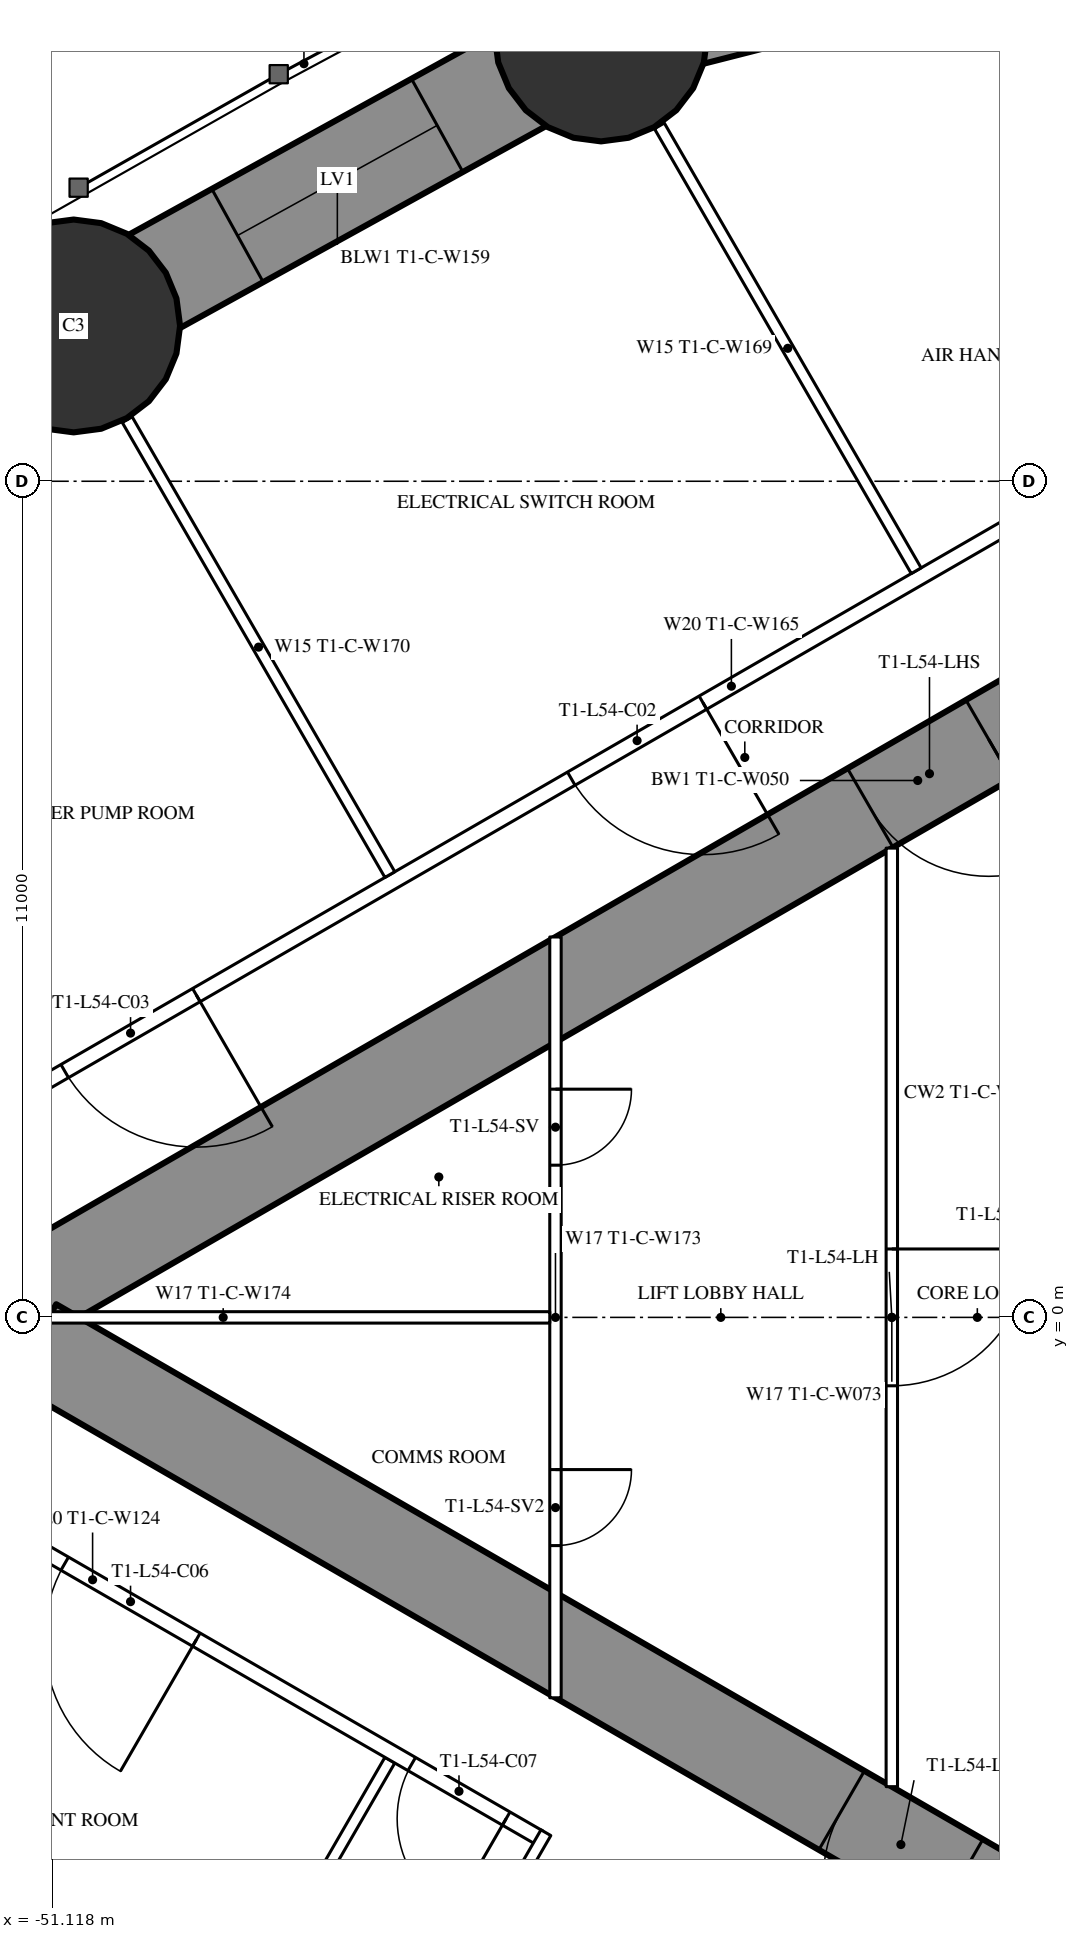
"""IFC4 building model, lengths in metres.
Left out: names, types, materials, properties, quantities, classifications, styles, units other than length and angle.
Written with IfcOpenShell. Run it as: python <this file> out.ifc"""

import sys

from ifc_helpers import new_model, si_unit, direction, frame, frame_2d, origin, origin_2d, place, context, subcontext, project, spatial, rectangle, circle, extrude, element, fill, save


model = new_model("IFC4")
c1 = context("Model", 3, precision=1e-05, world=origin(), true_north=direction((0.0, 1.0)))
c2 = subcontext(c1, "Body", "Model", "MODEL_VIEW")
j1 = project(units=[si_unit("LENGTHUNIT", "METRE"), si_unit("PLANEANGLEUNIT", "RADIAN")], contexts=[c1])
p1 = place(None, origin())
s1 = spatial("IfcSite", under=j1, at=p1, CompositionType="ELEMENT")
p2 = place(p1, origin())
s2 = spatial("IfcBuilding", under=s1, at=p2, CompositionType="ELEMENT")
p3 = place(p2, frame((0.0, 0.0, 201.8)))
s3 = spatial("IfcBuildingStorey", under=s2, at=p3, CompositionType="ELEMENT", Elevation=201.8)
for number, where, z_axis, x_axis in (
    (1, (-43.9, 16.871, 0.0), (0.0, 0.0, 1.0), (1.0, 0.0, 0.0)),
    (2, (-50.839, 13.043, 0.0), (0.0, 0.0, 1.0), (1.0, 0.0, 0.0)),
):
    element("IfcColumn", number, at=place(p3, frame(where, z_axis=z_axis, x_axis=x_axis)), inside=s3, PredefinedType="COLUMN", context=c2, shape_type="SweptSolid", body=[
        extrude(circle(Radius=1.4, at=origin_2d()), origin(), (0.0, 0.0, 1.0), 3.5),
    ])
p4 = place(p3, frame((-27.2, 14.3, 0.0), z_axis=(0.0, 0.0, 1.0), x_axis=(-0.866026593062, -0.499997940104, 0.0)))
e3 = element("IfcWall", 3, at=p4, inside=s3, PredefinedType="SHEAR", context=c2, shape_type="SweptSolid", body=[
    extrude(rectangle(XDim=28.946, YDim=1.2, at=frame_2d((14.473, 0.0))), origin(), (0.0, 0.0, 1.0), 3.5),
])
p5 = place(p4, frame((6.5, 0.0, 0.0)))
e4 = element("IfcOpeningElement", 4, at=p5, cuts=e3, PredefinedType="OPENING", context=c2, shape_type="SweptSolid", body=[
    extrude(rectangle(XDim=1.0, YDim=2.2, at=frame_2d((0.5, 1.1))), frame((0.0, 0.61, 0.0), z_axis=(0.0, -1.0, 0.0), x_axis=(1.0, 0.0, 0.0)), (0.0, 0.0, 1.0), 1.22),
])
p6 = place(p4, frame((13.395, 0.0, 0.0)))
e5 = element("IfcOpeningElement", 5, at=p6, cuts=e3, PredefinedType="OPENING", context=c2, shape_type="SweptSolid", body=[
    extrude(rectangle(XDim=1.8, YDim=2.03, at=frame_2d((0.9, 1.015))), frame((0.0, 0.61, 0.0), z_axis=(0.0, -1.0, 0.0), x_axis=(1.0, 0.0, 0.0)), (0.0, 0.0, 1.0), 1.22),
])
p7 = place(p3, frame((-27.2, -14.3, 0.0), z_axis=(0.0, 0.0, 1.0), x_axis=(-0.866024021859, 0.500002393557, 0.0)))
e6 = element("IfcWall", 6, at=p7, inside=s3, PredefinedType="SHEAR", context=c2, shape_type="SweptSolid", body=[
    extrude(rectangle(XDim=27.907, YDim=1.2, at=frame_2d((13.954, 0.0))), origin(), (0.0, 0.0, 1.0), 3.5),
])
p8 = place(p7, frame((6.5, 0.0, 0.0)))
e7 = element("IfcOpeningElement", 7, at=p8, cuts=e6, PredefinedType="OPENING", context=c2, shape_type="SweptSolid", body=[
    extrude(rectangle(XDim=1.0, YDim=2.2, at=frame_2d((0.5, 1.1))), frame((0.0, 0.61, 0.0), z_axis=(0.0, -1.0, 0.0), x_axis=(1.0, 0.0, 0.0)), (0.0, 0.0, 1.0), 1.22),
])
p9 = place(p7, frame((13.829, 0.0, 0.0)))
e8 = element("IfcOpeningElement", 8, at=p9, cuts=e6, PredefinedType="OPENING", context=c2, shape_type="SweptSolid", body=[
    extrude(rectangle(XDim=1.8, YDim=2.2, at=frame_2d((0.9, 1.1))), frame((0.0, 0.61, 0.0), z_axis=(0.0, -1.0, 0.0), x_axis=(1.0, 0.0, 0.0)), (0.0, 0.0, 1.0), 1.22),
])
p10 = place(p3, frame((-31.565, 20.016, 0.0), z_axis=(0.0, 0.0, 1.0), x_axis=(-0.969008414312, -0.247027717052, 0.0)))
e9 = element("IfcWall", 9, at=p10, inside=s3, PredefinedType="SHEAR", context=c2, shape_type="SweptSolid", body=[
    extrude(rectangle(XDim=12.729, YDim=1.4, at=frame_2d((6.365, 0.0))), origin(), (0.0, 0.0, 1.0), 3.5),
])
p11 = place(p10, frame((4.865, 0.0, 0.6)))
e10 = element("IfcOpeningElement", 10, at=p11, cuts=e9, PredefinedType="OPENING", context=c2, shape_type="SweptSolid", body=[
    extrude(rectangle(XDim=3.0, YDim=1.2, at=frame_2d((1.5, 0.6))), frame((0.0, 0.71, 0.0), z_axis=(0.0, -1.0, 0.0), x_axis=(1.0, 0.0, 0.0)), (0.0, 0.0, 1.0), 1.42),
])
p12 = place(p3, frame((-43.9, 16.871, 0.0), z_axis=(0.0, 0.0, 1.0), x_axis=(-0.875577684027, -0.483077342911, 0.0)))
e11 = element("IfcWall", 11, at=p12, inside=s3, PredefinedType="SHEAR", context=c2, shape_type="SweptSolid", body=[
    extrude(rectangle(XDim=7.925, YDim=1.4, at=frame_2d((3.962, 0.0))), origin(), (0.0, 0.0, 1.0), 3.5),
])
p13 = place(p12, frame((2.462, 0.0, 0.6)))
e12 = element("IfcOpeningElement", 12, at=p13, cuts=e11, PredefinedType="OPENING", context=c2, shape_type="SweptSolid", body=[
    extrude(rectangle(XDim=3.0, YDim=1.2, at=frame_2d((1.5, 0.6))), frame((0.0, 0.71, 0.0), z_axis=(0.0, -1.0, 0.0), x_axis=(1.0, 0.0, 0.0)), (0.0, 0.0, 1.0), 1.42),
])
p14 = place(p3, frame((-50.839, 13.043, 0.0), z_axis=(0.0, 0.0, 1.0), x_axis=(-0.851892008043, -0.523717487423, 0.0)))
e13 = element("IfcWall", 13, at=p14, inside=s3, PredefinedType="SHEAR", context=c2, shape_type="SweptSolid", body=[
    extrude(rectangle(XDim=7.924, YDim=1.4, at=frame_2d((3.962, 0.0))), origin(), (0.0, 0.0, 1.0), 3.5),
])
p15 = place(p14, frame((2.462, 0.0, 0.6)))
e14 = element("IfcOpeningElement", 14, at=p15, cuts=e13, PredefinedType="OPENING", context=c2, shape_type="SweptSolid", body=[
    extrude(rectangle(XDim=3.0, YDim=1.2, at=frame_2d((1.5, 0.6))), frame((0.0, 0.71, 0.0), z_axis=(0.0, -1.0, 0.0), x_axis=(1.0, 0.0, 0.0)), (0.0, 0.0, 1.0), 1.42),
])
p16 = place(p3, frame((-27.803, 16.608, 0.0), z_axis=(0.0, 0.0, 1.0), x_axis=(-0.866025851808, -0.499999223999, 0.0)))
e15 = element("IfcWall", 15, at=p16, inside=s3, PredefinedType="PARTITIONING", context=c2, shape_type="SweptSolid", body=[
    extrude(rectangle(XDim=33.215, YDim=0.2, at=frame_2d((16.608, 0.0))), origin(), (0.0, 0.0, 1.0), 3.25),
])
p17 = place(p16, frame((5.584, 0.0, 0.0)))
e16 = element("IfcOpeningElement", 16, at=p17, cuts=e15, PredefinedType="OPENING", context=c2, shape_type="SweptSolid", body=[
    extrude(rectangle(XDim=2.0, YDim=2.4, at=frame_2d((1.0, 1.2))), frame((0.0, 0.11, 0.0), z_axis=(0.0, -1.0, 0.0), x_axis=(1.0, 0.0, 0.0)), (0.0, 0.0, 1.0), 0.22),
])
p18 = place(p16, frame((17.04, 0.0, 0.0)))
e17 = element("IfcOpeningElement", 17, at=p18, cuts=e15, PredefinedType="OPENING", context=c2, shape_type="SweptSolid", body=[
    extrude(rectangle(XDim=2.0, YDim=2.4, at=frame_2d((1.0, 1.2))), frame((0.0, 0.11, 0.0), z_axis=(0.0, -1.0, 0.0), x_axis=(1.0, 0.0, 0.0)), (0.0, 0.0, 1.0), 0.22),
])
p19 = place(p16, frame((24.735, 0.0, 0.0)))
e18 = element("IfcOpeningElement", 18, at=p19, cuts=e15, PredefinedType="OPENING", context=c2, shape_type="SweptSolid", body=[
    extrude(rectangle(XDim=2.0, YDim=2.4, at=frame_2d((1.0, 1.2))), frame((0.0, 0.11, 0.0), z_axis=(0.0, -1.0, 0.0), x_axis=(1.0, 0.0, 0.0)), (0.0, 0.0, 1.0), 0.22),
])
p20 = place(p16, frame((30.361, 0.0, 0.0)))
e19 = element("IfcOpeningElement", 19, at=p20, cuts=e15, PredefinedType="OPENING", context=c2, shape_type="SweptSolid", body=[
    extrude(rectangle(XDim=2.0, YDim=2.03, at=frame_2d((1.0, 1.015))), frame((0.0, 0.11, 0.0), z_axis=(0.0, -1.0, 0.0), x_axis=(1.0, 0.0, 0.0)), (0.0, 0.0, 1.0), 0.22),
])
p21 = place(p3, frame((-39.754, 9.823, 0.0), z_axis=(0.0, 0.0, 1.0), x_axis=(-0.499997670926, 0.866026748472, 0.0)))
e20 = element("IfcWall", 20, at=p21, inside=s3, PredefinedType="PARTITIONING", context=c2, shape_type="SweptSolid", body=[
    extrude(rectangle(XDim=6.757, YDim=0.15, at=frame_2d((3.379, 0.0))), origin(), (0.0, 0.0, 1.0), 2.05),
])
for number, where, z_axis, x_axis in (
    (21, (-46.679, 5.825, 0.0), (0.0, 0.0, 1.0), (-0.5, 0.866, 0.0)),
    (22, (-46.679, -5.825, 0.0), (0.0, 0.0, 1.0), (-0.5, -0.866, 0.0)),
):
    element("IfcWall", number, at=place(p3, frame(where, z_axis=z_axis, x_axis=x_axis)), inside=s3, PredefinedType="PARTITIONING", context=c2, shape_type="SweptSolid", body=[
        extrude(rectangle(XDim=6.911, YDim=0.15, at=frame_2d((3.456, 0.0))), origin(), (0.0, 0.0, 1.0), 2.05),
    ])
p22 = place(p3, frame((-44.715, -6.844, 0.0), z_axis=(0.0, 0.0, 1.0), x_axis=(-0.866025261224, 0.500000246922, 0.0)))
e23 = element("IfcWall", 23, at=p22, inside=s3, PredefinedType="PARTITIONING", context=c2, shape_type="SweptSolid", body=[
    extrude(rectangle(XDim=13.567, YDim=0.2, at=frame_2d((6.783, 0.0))), origin(), (0.0, 0.0, 1.0), 3.25),
])
p23 = place(p22, frame((10.773, 0.0, 0.0)))
e24 = element("IfcOpeningElement", 24, at=p23, cuts=e23, PredefinedType="OPENING", context=c2, shape_type="SweptSolid", body=[
    extrude(rectangle(XDim=2.0, YDim=2.03, at=frame_2d((1.0, 1.015))), frame((0.0, 0.11, 0.0), z_axis=(0.0, -1.0, 0.0), x_axis=(1.0, 0.0, 0.0)), (0.0, 0.0, 1.0), 0.22),
])
p24 = place(p22, frame((5.207, 0.0, 0.0)))
e25 = element("IfcOpeningElement", 25, at=p24, cuts=e23, PredefinedType="OPENING", context=c2, shape_type="SweptSolid", body=[
    extrude(rectangle(XDim=2.0, YDim=2.4, at=frame_2d((1.0, 1.2))), frame((0.0, 0.11, 0.0), z_axis=(0.0, -1.0, 0.0), x_axis=(1.0, 0.0, 0.0)), (0.0, 0.0, 1.0), 0.22),
])
p25 = place(p22, frame((0.5, 0.0, 0.0)))
e26 = element("IfcOpeningElement", 26, at=p25, cuts=e23, PredefinedType="OPENING", context=c2, shape_type="SweptSolid", body=[
    extrude(rectangle(XDim=1.435, YDim=2.03, at=frame_2d((0.718, 1.015))), frame((0.0, 0.11, 0.0), z_axis=(0.0, -1.0, 0.0), x_axis=(1.0, 0.0, 0.0)), (0.0, 0.0, 1.0), 0.22),
])
p26 = place(p3, frame((-44.626, -6.779, 0.0), z_axis=(0.0, 0.0, 1.0), x_axis=(-0.500022947832, -0.866012154442, 0.0)))
e27 = element("IfcWall", 27, at=p26, inside=s3, PredefinedType="PARTITIONING", context=c2, shape_type="SweptSolid", body=[
    extrude(rectangle(XDim=1.805, YDim=0.15, at=frame_2d((0.903, 0.0))), origin(), (0.0, 0.0, 1.0), 3.25),
])
p27 = place(p3, frame((-40.075, 6.174, 0.0), z_axis=(0.0, 0.0, 1.0), x_axis=(0.0, -1.0, 0.0)))
e28 = element("IfcWall", 28, at=p27, inside=s3, PredefinedType="PARTITIONING", context=c2, shape_type="SweptSolid", body=[
    extrude(rectangle(XDim=12.348, YDim=0.15, at=frame_2d((6.174, 0.0))), origin(), (0.0, 0.0, 1.0), 3.25),
])
p28 = place(p27, frame((5.274, 0.0, 0.0)))
e29 = element("IfcOpeningElement", 29, at=p28, cuts=e28, PredefinedType="OPENING", context=c2, shape_type="SweptSolid", body=[
    extrude(rectangle(XDim=1.8, YDim=2.2, at=frame_2d((0.9, 1.1))), frame((0.0, 0.085, 0.0), z_axis=(0.0, -1.0, 0.0), x_axis=(1.0, 0.0, 0.0)), (0.0, 0.0, 1.0), 0.17),
])
p29 = place(p3, frame((-44.5, 5.005, 0.0), z_axis=(0.0, 0.0, 1.0), x_axis=(0.0, -1.0, 0.0)))
e30 = element("IfcWall", 30, at=p29, inside=s3, PredefinedType="PARTITIONING", context=c2, shape_type="SweptSolid", body=[
    extrude(rectangle(XDim=10.009, YDim=0.15, at=frame_2d((5.005, 0.0))), origin(), (0.0, 0.0, 1.0), 3.25),
])
p30 = place(p29, frame((2.002, 0.0, 0.0)))
e31 = element("IfcOpeningElement", 31, at=p30, cuts=e30, PredefinedType="OPENING", context=c2, shape_type="SweptSolid", body=[
    extrude(rectangle(XDim=1.0, YDim=2.2, at=frame_2d((0.5, 1.1))), frame((0.0, 0.085, 0.0), z_axis=(0.0, -1.0, 0.0), x_axis=(1.0, 0.0, 0.0)), (0.0, 0.0, 1.0), 0.17),
])
p31 = place(p29, frame((7.007, 0.0, 0.0)))
e32 = element("IfcOpeningElement", 32, at=p31, cuts=e30, PredefinedType="OPENING", context=c2, shape_type="SweptSolid", body=[
    extrude(rectangle(XDim=1.0, YDim=2.2, at=frame_2d((0.5, 1.1))), frame((0.0, 0.085, 0.0), z_axis=(0.0, -1.0, 0.0), x_axis=(1.0, 0.0, 0.0)), (0.0, 0.0, 1.0), 0.17),
])
p32 = place(p3, frame((-44.575, 0.0, 0.0), z_axis=(0.0, 0.0, 1.0), x_axis=(-1.0, 0.0, 0.0)))
e33 = element("IfcWall", 33, at=p32, inside=s3, PredefinedType="PARTITIONING", context=c2, shape_type="SweptSolid", body=[
    extrude(rectangle(XDim=8.593, YDim=0.15, at=frame_2d((4.297, 0.0))), origin(), (0.0, 0.0, 1.0), 2.05),
])
p33 = place(p13, origin())
e34 = element("IfcWindow", 34, at=p33, inside=s3, PartitioningType="SINGLE_PANEL", PredefinedType="WINDOW", context=c2, shape_type="SweptSolid", body=[
    extrude(rectangle(XDim=3.0, YDim=1.2, at=frame_2d((1.5, 0.6))), frame((0.0, 0.03, 0.0), z_axis=(0.0, -1.0, 0.0), x_axis=(1.0, 0.0, 0.0)), (0.0, 0.0, 1.0), 0.06),
])
fill(e12, e34)
p34 = place(p18, origin())
e35 = element("IfcDoor", 35, at=p34, inside=s3, OperationType="DOUBLE_DOOR_SINGLE_SWING", PredefinedType="DOOR", context=c2, shape_type="SweptSolid", body=[
    extrude(rectangle(XDim=2.0, YDim=2.4, at=frame_2d((1.0, 1.2))), frame((0.0, 0.025, 0.0), z_axis=(0.0, -1.0, 0.0), x_axis=(1.0, 0.0, 0.0)), (0.0, 0.0, 1.0), 0.05),
])
fill(e17, e35)
p35 = place(p19, origin())
e36 = element("IfcDoor", 36, at=p35, inside=s3, OperationType="DOUBLE_DOOR_SINGLE_SWING", PredefinedType="DOOR", context=c2, shape_type="SweptSolid", body=[
    extrude(rectangle(XDim=2.0, YDim=2.4, at=frame_2d((1.0, 1.2))), frame((0.0, 0.025, 0.0), z_axis=(0.0, -1.0, 0.0), x_axis=(1.0, 0.0, 0.0)), (0.0, 0.0, 1.0), 0.05),
])
fill(e18, e36)
p36 = place(p24, origin())
e37 = element("IfcDoor", 37, at=p36, inside=s3, OperationType="DOUBLE_DOOR_SINGLE_SWING", PredefinedType="DOOR", context=c2, shape_type="SweptSolid", body=[
    extrude(rectangle(XDim=2.0, YDim=2.4, at=frame_2d((1.0, 1.2))), frame((0.0, 0.025, 0.0), z_axis=(0.0, -1.0, 0.0), x_axis=(1.0, 0.0, 0.0)), (0.0, 0.0, 1.0), 0.05),
])
fill(e25, e37)
p37 = place(p25, origin())
e38 = element("IfcDoor", 38, at=p37, inside=s3, OperationType="SINGLE_SWING_LEFT", PredefinedType="DOOR", context=c2, shape_type="SweptSolid", body=[
    extrude(rectangle(XDim=1.435, YDim=2.03, at=frame_2d((0.718, 1.015))), frame((0.0, 0.025, 0.0), z_axis=(0.0, -1.0, 0.0), x_axis=(1.0, 0.0, 0.0)), (0.0, 0.0, 1.0), 0.05),
])
fill(e26, e38)
p38 = place(p28, origin())
e39 = element("IfcDoor", 39, at=p38, inside=s3, OperationType="DOUBLE_DOOR_SINGLE_SWING", PredefinedType="DOOR", context=c2, shape_type="SweptSolid", body=[
    extrude(rectangle(XDim=1.8, YDim=2.2, at=frame_2d((0.9, 1.1))), frame((0.0, 0.025, 0.0), z_axis=(0.0, -1.0, 0.0), x_axis=(1.0, 0.0, 0.0)), (0.0, 0.0, 1.0), 0.05),
])
fill(e29, e39)
p39 = place(p30, origin())
e40 = element("IfcDoor", 40, at=p39, inside=s3, OperationType="SINGLE_SWING_LEFT", PredefinedType="DOOR", context=c2, shape_type="SweptSolid", body=[
    extrude(rectangle(XDim=1.0, YDim=2.2, at=frame_2d((0.5, 1.1))), frame((0.0, 0.025, 0.0), z_axis=(0.0, -1.0, 0.0), x_axis=(1.0, 0.0, 0.0)), (0.0, 0.0, 1.0), 0.05),
])
fill(e31, e40)
p40 = place(p31, origin())
e41 = element("IfcDoor", 41, at=p40, inside=s3, OperationType="SINGLE_SWING_LEFT", PredefinedType="DOOR", context=c2, shape_type="SweptSolid", body=[
    extrude(rectangle(XDim=1.0, YDim=2.2, at=frame_2d((0.5, 1.1))), frame((0.0, 0.025, 0.0), z_axis=(0.0, -1.0, 0.0), x_axis=(1.0, 0.0, 0.0)), (0.0, 0.0, 1.0), 0.05),
])
fill(e32, e41)
p41 = place(p6, origin())
e42 = element("IfcDoor", 42, at=p41, inside=s3, OperationType="DOUBLE_DOOR_SINGLE_SWING", PredefinedType="DOOR", context=c2, shape_type="SweptSolid", body=[
    extrude(rectangle(XDim=1.8, YDim=2.03, at=frame_2d((0.9, 1.015))), frame((0.0, 0.025, 0.0), z_axis=(0.0, -1.0, 0.0), x_axis=(1.0, 0.0, 0.0)), (0.0, 0.0, 1.0), 0.05),
])
fill(e5, e42)
p42 = place(p9, origin())
e43 = element("IfcDoor", 43, at=p42, inside=s3, OperationType="DOUBLE_DOOR_SINGLE_SWING", PredefinedType="DOOR", context=c2, shape_type="SweptSolid", body=[
    extrude(rectangle(XDim=1.8, YDim=2.2, at=frame_2d((0.9, 1.1))), frame((0.0, 0.025, 0.0), z_axis=(0.0, -1.0, 0.0), x_axis=(1.0, 0.0, 0.0)), (0.0, 0.0, 1.0), 0.05),
])
fill(e8, e43)
save(model, sys.argv[1])
